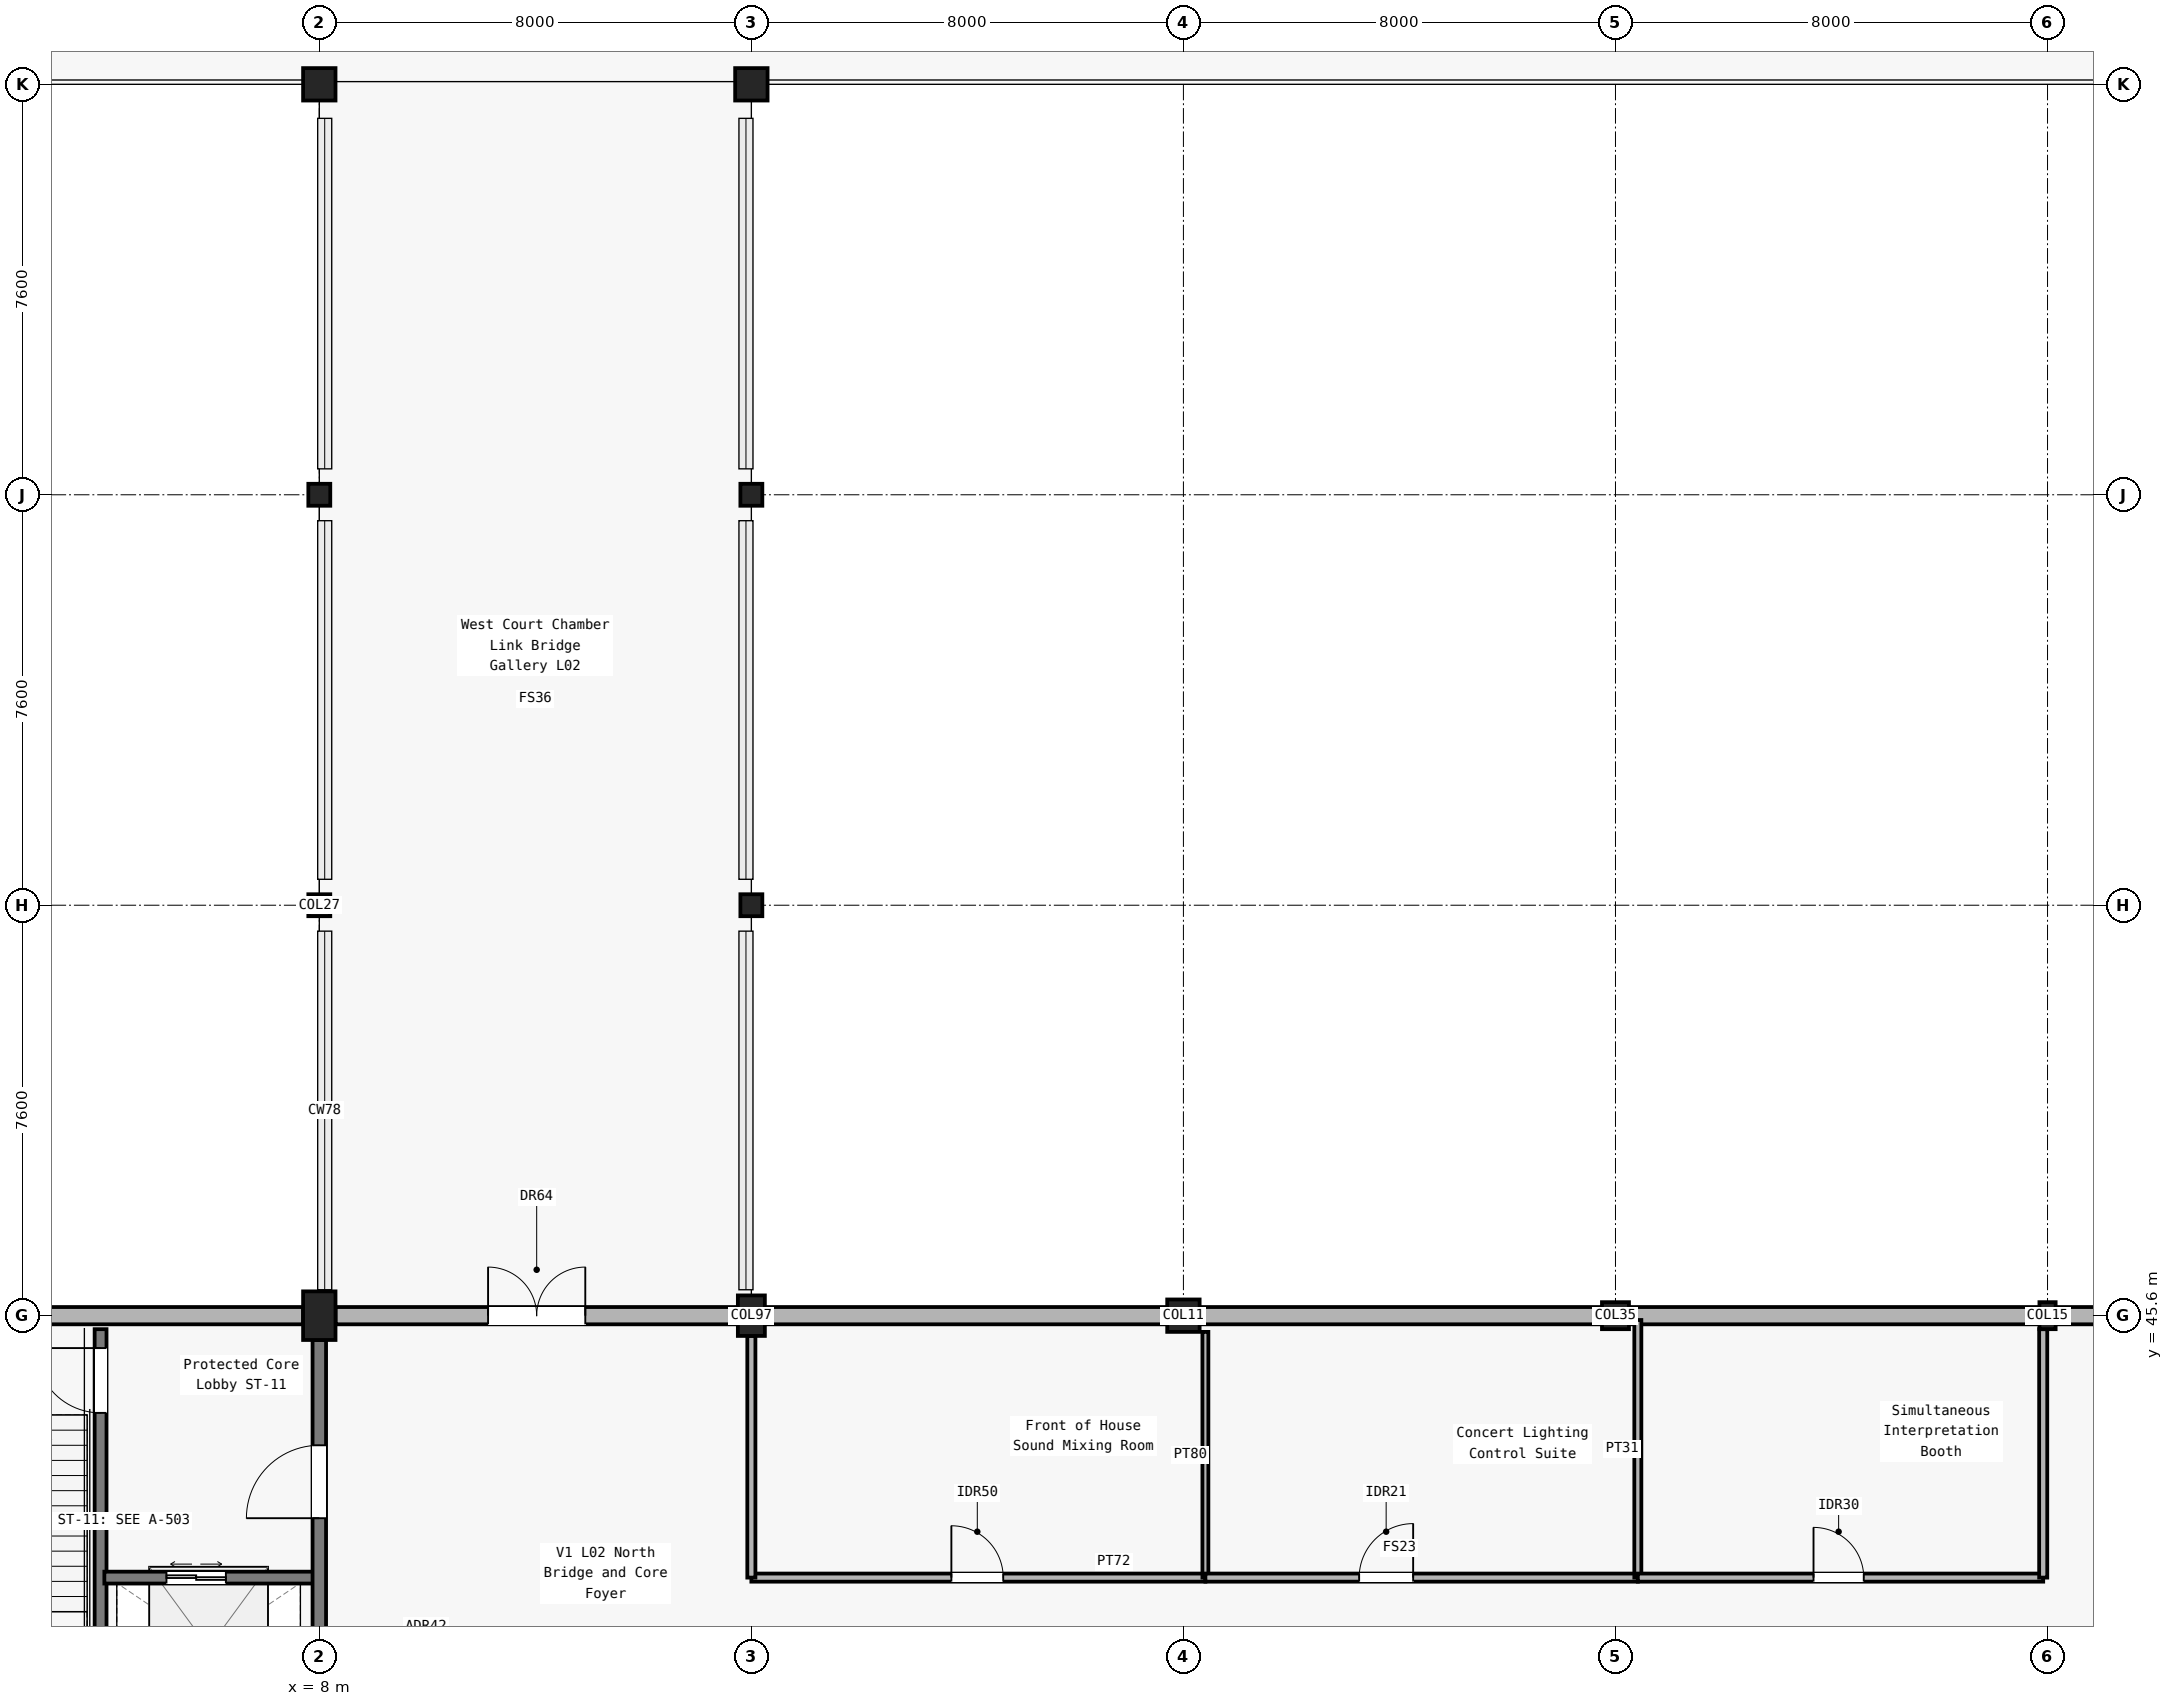
"""IFC4 building model, lengths in metres.
Left out: names, types, materials, properties, quantities, classifications, styles, units other than length and angle.
Written with IfcOpenShell. Run it as: python <this file> out.ifc"""

import sys

from ifc_helpers import new_model, si_unit, direction, frame, frame_2d, origin, origin_2d, place, context, subcontext, project, spatial, rectangle, hollow_circle, i_section, extrude, element, fill, save


model = new_model("IFC4")
c1 = context("Model", 3, precision=1e-05, world=origin(), true_north=direction((0.0, 1.0)))
c2 = subcontext(c1, "Body", "Model", "MODEL_VIEW")
j1 = project(units=[si_unit("LENGTHUNIT", "METRE"), si_unit("PLANEANGLEUNIT", "RADIAN")], contexts=[c1])
p1 = place(None, origin())
s1 = spatial("IfcSite", under=j1, at=p1, CompositionType="ELEMENT")
p2 = place(p1, origin())
s2 = spatial("IfcBuilding", under=s1, at=p2, CompositionType="ELEMENT")
p3 = place(p2, frame((0.0, 0.0, 10.2)))
s3 = spatial("IfcBuildingStorey", under=s2, at=p3, CompositionType="ELEMENT", Elevation=10.2)
p4 = place(p3, frame((8.0, 45.6, 0.0), z_axis=(0.0, 0.0, 1.0), x_axis=(1.0, 0.0, 0.0)))
e1 = element("IfcColumn", 1, at=p4, inside=s3, PredefinedType="COLUMN", context=c2, shape_type="SweptSolid", body=[
    extrude(rectangle(XDim=0.6, YDim=0.9, at=origin_2d()), origin(), (0.0, 0.0, 1.0), 4.8),
])
p5 = place(p3, frame((16.0, 45.6, 0.0), z_axis=(0.0, 0.0, 1.0), x_axis=(1.0, 0.0, 0.0)))
e2 = element("IfcColumn", 2, at=p5, inside=s3, PredefinedType="COLUMN", context=c2, shape_type="SweptSolid", body=[
    extrude(rectangle(XDim=0.5, YDim=0.75, at=origin_2d()), origin(), (0.0, 0.0, 1.0), 4.8),
])
p6 = place(p3, frame((24.0, 45.6, 0.0), z_axis=(0.0, 0.0, 1.0), x_axis=(1.0, 0.0, 0.0)))
e3 = element("IfcColumn", 3, at=p6, inside=s3, PredefinedType="COLUMN", context=c2, shape_type="SweptSolid", body=[
    extrude(rectangle(XDim=0.6, YDim=0.6, at=origin_2d()), origin(), (0.0, 0.0, 1.0), 4.8),
])
p7 = place(p3, frame((32.0, 45.6, 0.0), z_axis=(0.0, 0.0, 1.0), x_axis=(1.0, 0.0, 0.0)))
e4 = element("IfcColumn", 4, at=p7, inside=s3, PredefinedType="COLUMN", context=c2, shape_type="SweptSolid", body=[
    extrude(rectangle(XDim=0.5, YDim=0.5, at=origin_2d()), origin(), (0.0, 0.0, 1.0), 4.8),
])
p8 = place(p3, frame((40.0, 45.6, 0.0), z_axis=(0.0, 0.0, 1.0), x_axis=(1.0, 0.0, 0.0)))
e5 = element("IfcColumn", 5, at=p8, inside=s3, PredefinedType="COLUMN", context=c2, shape_type="SweptSolid", body=[
    extrude(i_section(OverallWidth=0.3, OverallDepth=0.5, WebThickness=0.014, FlangeThickness=0.028, FilletRadius=0.027, at=origin_2d()), origin(), (0.0, 0.0, 1.0), 4.8),
])
for number, where, z_axis, x_axis in (
    (6, (8.0, 68.4, 0.0), (0.0, 0.0, 1.0), (1.0, 0.0, 0.0)),
    (7, (16.0, 68.4, 0.0), (0.0, 0.0, 1.0), (1.0, 0.0, 0.0)),
):
    element("IfcColumn", number, at=place(p3, frame(where, z_axis=z_axis, x_axis=x_axis)), inside=s3, PredefinedType="COLUMN", context=c2, shape_type="SweptSolid", body=[
        extrude(rectangle(XDim=0.6, YDim=0.6, at=origin_2d()), origin(), (0.0, 0.0, 1.0), 4.8),
    ])
for number, where, z_axis, x_axis in (
    (8, (8.0, 53.2, 0.0), (0.0, 0.0, 1.0), (1.0, 0.0, 0.0)),
    (9, (8.0, 60.8, 0.0), (0.0, 0.0, 1.0), (1.0, 0.0, 0.0)),
    (10, (16.0, 53.2, 0.0), (0.0, 0.0, 1.0), (1.0, 0.0, 0.0)),
    (11, (16.0, 60.8, 0.0), (0.0, 0.0, 1.0), (1.0, 0.0, 0.0)),
):
    element("IfcColumn", number, at=place(p3, frame(where, z_axis=z_axis, x_axis=x_axis)), inside=s3, PredefinedType="COLUMN", context=c2, shape_type="SweptSolid", body=[
        extrude(hollow_circle(Radius=0.203, WallThickness=0.02, at=origin_2d()), origin(), (0.0, 0.0, 1.0), 4.58),
    ])
p9 = place(p3, frame((0.35, 45.6, 0.0), z_axis=(0.0, 0.0, 1.0), x_axis=(1.0, 0.0, 0.0)))
e12 = element("IfcWall", 12, at=p9, inside=s3, PredefinedType="SOLIDWALL", context=c2, shape_type="SweptSolid", body=[
    extrude(rectangle(XDim=7.35, YDim=0.32, at=frame_2d((3.675, 0.0))), origin(), (0.0, 0.0, 1.0), 3.86),
])
p10 = place(p3, frame((8.3, 45.6, 0.0), z_axis=(0.0, 0.0, 1.0), x_axis=(1.0, 0.0, 0.0)))
e13 = element("IfcWall", 13, at=p10, inside=s3, PredefinedType="SOLIDWALL", context=c2, shape_type="SweptSolid", body=[
    extrude(rectangle(XDim=7.45, YDim=0.32, at=frame_2d((3.725, 0.0))), origin(), (0.0, 0.0, 1.0), 3.86),
])
p11 = place(p10, frame((2.825, 0.0, 0.0)))
e14 = element("IfcOpeningElement", 14, at=p11, cuts=e13, PredefinedType="OPENING", context=c2, shape_type="SweptSolid", body=[
    extrude(rectangle(XDim=1.8, YDim=2.25, at=frame_2d((0.9, 1.125))), frame((0.0, 0.17, 0.0), z_axis=(0.0, -1.0, 0.0), x_axis=(1.0, 0.0, 0.0)), (0.0, 0.0, 1.0), 0.34),
])
p12 = place(p3, frame((16.25, 45.6, 0.0), z_axis=(0.0, 0.0, 1.0), x_axis=(1.0, 0.0, 0.0)))
e15 = element("IfcWall", 15, at=p12, inside=s3, PredefinedType="SOLIDWALL", context=c2, shape_type="SweptSolid", body=[
    extrude(rectangle(XDim=7.45, YDim=0.32, at=frame_2d((3.725, 0.0))), origin(), (0.0, 0.0, 1.0), 3.86),
])
p13 = place(p3, frame((24.3, 45.6, 0.0), z_axis=(0.0, 0.0, 1.0), x_axis=(1.0, 0.0, 0.0)))
e16 = element("IfcWall", 16, at=p13, inside=s3, PredefinedType="SOLIDWALL", context=c2, shape_type="SweptSolid", body=[
    extrude(rectangle(XDim=7.45, YDim=0.32, at=frame_2d((3.725, 0.0))), origin(), (0.0, 0.0, 1.0), 3.91),
])
p14 = place(p3, frame((32.25, 45.6, 0.0), z_axis=(0.0, 0.0, 1.0), x_axis=(1.0, 0.0, 0.0)))
e17 = element("IfcWall", 17, at=p14, inside=s3, PredefinedType="SOLIDWALL", context=c2, shape_type="SweptSolid", body=[
    extrude(rectangle(XDim=7.6, YDim=0.32, at=frame_2d((3.8, 0.0))), origin(), (0.0, 0.0, 1.0), 3.41),
])
p15 = place(p3, frame((40.15, 45.6, 0.0), z_axis=(0.0, 0.0, 1.0), x_axis=(1.0, 0.0, 0.0)))
e18 = element("IfcWall", 18, at=p15, inside=s3, PredefinedType="SOLIDWALL", context=c2, shape_type="SweptSolid", body=[
    extrude(rectangle(XDim=9.3, YDim=0.32, at=frame_2d((4.65, 0.0))), origin(), (0.0, 0.0, 1.0), 3.41),
])
p16 = place(p3, frame((3.95, 38.25, 0.0), z_axis=(0.0, 0.0, 1.0), x_axis=(0.0, 1.0, 0.0)))
e19 = element("IfcWall", 19, at=p16, inside=s3, PredefinedType="SOLIDWALL", context=c2, shape_type="SweptSolid", body=[
    extrude(rectangle(XDim=7.1, YDim=0.22, at=frame_2d((3.55, 0.0))), origin(), (0.0, 0.0, 1.0), 4.52),
])
p17 = place(p16, frame((5.55, 0.0, 0.0)))
e20 = element("IfcOpeningElement", 20, at=p17, cuts=e19, PredefinedType="OPENING", context=c2, shape_type="SweptSolid", body=[
    extrude(rectangle(XDim=1.2, YDim=2.15, at=frame_2d((0.6, 1.075))), frame((0.0, 0.12, 0.0), z_axis=(0.0, -1.0, 0.0), x_axis=(1.0, 0.0, 0.0)), (0.0, 0.0, 1.0), 0.24),
])
p18 = place(p3, frame((4.02, 40.75, 0.0), z_axis=(0.0, 0.0, 1.0), x_axis=(1.0, 0.0, 0.0)))
e21 = element("IfcWall", 21, at=p18, inside=s3, PredefinedType="SOLIDWALL", context=c2, shape_type="SweptSolid", body=[
    extrude(rectangle(XDim=3.93, YDim=0.22, at=frame_2d((1.965, 0.0))), origin(), (0.0, 0.0, 1.0), 3.87),
])
p19 = place(p18, frame((1.15, 0.0, 0.0)))
e22 = element("IfcOpeningElement", 22, at=p19, cuts=e21, PredefinedType="OPENING", context=c2, shape_type="SweptSolid", body=[
    extrude(rectangle(XDim=1.1, YDim=2.2, at=frame_2d((0.55, 1.1))), frame((0.0, 0.12, 0.0), z_axis=(0.0, -1.0, 0.0), x_axis=(1.0, 0.0, 0.0)), (0.0, 0.0, 1.0), 0.24),
])
p20 = place(p3, frame((8.0, 38.35, 0.0), z_axis=(0.0, 0.0, 1.0), x_axis=(0.0, 1.0, 0.0)))
e23 = element("IfcWall", 23, at=p20, inside=s3, PredefinedType="SOLIDWALL", context=c2, shape_type="SweptSolid", body=[
    extrude(rectangle(XDim=6.8, YDim=0.25, at=frame_2d((3.4, 0.0))), origin(), (0.0, 0.0, 1.0), 3.76),
])
p21 = place(p20, frame((3.5, 0.0, 0.0)))
e24 = element("IfcOpeningElement", 24, at=p21, cuts=e23, PredefinedType="OPENING", context=c2, shape_type="SweptSolid", body=[
    extrude(rectangle(XDim=1.35, YDim=2.2, at=frame_2d((0.675, 1.1))), frame((0.0, 0.135, 0.0), z_axis=(0.0, -1.0, 0.0), x_axis=(1.0, 0.0, 0.0)), (0.0, 0.0, 1.0), 0.27),
])
p22 = place(p3, frame((16.0, 40.75, 0.0), z_axis=(0.0, 0.0, 1.0), x_axis=(1.0, 0.0, 0.0)))
e25 = element("IfcWall", 25, at=p22, inside=s3, PredefinedType="PARTITIONING", context=c2, shape_type="SweptSolid", body=[
    extrude(rectangle(XDim=8.407, YDim=0.15, at=frame_2d((4.204, 0.0))), origin(), (0.0, 0.0, 1.0), 3.82),
])
p23 = place(p22, frame((3.704, 0.0, 0.0)))
e26 = element("IfcOpeningElement", 26, at=p23, cuts=e25, PredefinedType="OPENING", context=c2, shape_type="SweptSolid", body=[
    extrude(rectangle(XDim=0.96, YDim=2.05, at=frame_2d((0.48, 1.025))), frame((0.0, 0.085, 0.0), z_axis=(0.0, -1.0, 0.0), x_axis=(1.0, 0.0, 0.0)), (0.0, 0.0, 1.0), 0.17),
])
p24 = place(p3, frame((24.407, 40.75, 0.0), z_axis=(0.0, 0.0, 1.0), x_axis=(0.0, 1.0, 0.0)))
e27 = element("IfcWall", 27, at=p24, inside=s3, PredefinedType="PARTITIONING", context=c2, shape_type="SweptSolid", body=[
    extrude(rectangle(XDim=4.55, YDim=0.11, at=frame_2d((2.275, 0.0))), origin(), (0.0, 0.0, 1.0), 3.82),
])
p25 = place(p3, frame((24.407, 40.75, 0.0), z_axis=(0.0, 0.0, 1.0), x_axis=(1.0, 0.0, 0.0)))
e28 = element("IfcWall", 28, at=p25, inside=s3, PredefinedType="PARTITIONING", context=c2, shape_type="SweptSolid", body=[
    extrude(rectangle(XDim=8.007, YDim=0.15, at=frame_2d((4.003, 0.0))), origin(), (0.0, 0.0, 1.0), 3.82),
])
p26 = place(p25, frame((2.847, 0.0, 0.0)))
e29 = element("IfcOpeningElement", 29, at=p26, cuts=e28, PredefinedType="OPENING", context=c2, shape_type="SweptSolid", body=[
    extrude(rectangle(XDim=1.0, YDim=2.05, at=frame_2d((0.5, 1.025))), frame((0.0, 0.085, 0.0), z_axis=(0.0, -1.0, 0.0), x_axis=(1.0, 0.0, 0.0)), (0.0, 0.0, 1.0), 0.17),
])
p27 = place(p3, frame((32.414, 40.75, 0.0), z_axis=(0.0, 0.0, 1.0), x_axis=(0.0, 1.0, 0.0)))
e30 = element("IfcWall", 30, at=p27, inside=s3, PredefinedType="PARTITIONING", context=c2, shape_type="SweptSolid", body=[
    extrude(rectangle(XDim=4.77, YDim=0.13, at=frame_2d((2.385, 0.0))), origin(), (0.0, 0.0, 1.0), 3.77),
])
p28 = place(p3, frame((32.414, 40.75, 0.0), z_axis=(0.0, 0.0, 1.0), x_axis=(1.0, 0.0, 0.0)))
e31 = element("IfcWall", 31, at=p28, inside=s3, PredefinedType="PARTITIONING", context=c2, shape_type="SweptSolid", body=[
    extrude(rectangle(XDim=7.506, YDim=0.15, at=frame_2d((3.753, 0.0))), origin(), (0.0, 0.0, 1.0), 3.875),
])
p29 = place(p28, frame((3.253, 0.0, 0.0)))
e32 = element("IfcOpeningElement", 32, at=p29, cuts=e31, PredefinedType="OPENING", context=c2, shape_type="SweptSolid", body=[
    extrude(rectangle(XDim=0.93, YDim=2.1, at=frame_2d((0.465, 1.05))), frame((0.0, 0.085, 0.0), z_axis=(0.0, -1.0, 0.0), x_axis=(1.0, 0.0, 0.0)), (0.0, 0.0, 1.0), 0.17),
])
p30 = place(p3, frame((16.0, 40.75, 0.0), z_axis=(0.0, 0.0, 1.0), x_axis=(0.0, 1.0, 0.0)))
e33 = element("IfcWall", 33, at=p30, inside=s3, PredefinedType="PARTITIONING", context=c2, shape_type="SweptSolid", body=[
    extrude(rectangle(XDim=4.475, YDim=0.15, at=frame_2d((2.238, 0.0))), origin(), (0.0, 0.0, 1.0), 3.655),
])
p31 = place(p3, frame((39.92, 40.75, 0.0), z_axis=(0.0, 0.0, 1.0), x_axis=(0.0, 1.0, 0.0)))
e34 = element("IfcWall", 34, at=p31, inside=s3, PredefinedType="PARTITIONING", context=c2, shape_type="SweptSolid", body=[
    extrude(rectangle(XDim=4.6, YDim=0.15, at=frame_2d((2.3, 0.0))), origin(), (0.0, 0.0, 1.0), 3.41),
])
p32 = place(p11, origin())
e35 = element("IfcDoor", 35, at=p32, inside=s3, OperationType="DOUBLE_DOOR_SINGLE_SWING", PredefinedType="DOOR", context=c2, shape_type="SweptSolid", body=[
    extrude(rectangle(XDim=1.8, YDim=2.25, at=frame_2d((0.9, 1.125))), frame((0.0, 0.025, 0.0), z_axis=(0.0, -1.0, 0.0), x_axis=(1.0, 0.0, 0.0)), (0.0, 0.0, 1.0), 0.05),
])
fill(e14, e35)
p33 = place(p17, origin())
e36 = element("IfcDoor", 36, at=p33, inside=s3, OperationType="SINGLE_SWING_RIGHT", PredefinedType="DOOR", context=c2, shape_type="SweptSolid", body=[
    extrude(rectangle(XDim=1.2, YDim=2.15, at=frame_2d((0.6, 1.075))), frame((0.0, 0.025, 0.0), z_axis=(0.0, -1.0, 0.0), x_axis=(1.0, 0.0, 0.0)), (0.0, 0.0, 1.0), 0.05),
])
fill(e20, e36)
p34 = place(p19, origin())
e37 = element("IfcDoor", 37, at=p34, inside=s3, OperationType="DOUBLE_DOOR_SLIDING", PredefinedType="DOOR", context=c2, shape_type="SweptSolid", body=[
    extrude(rectangle(XDim=1.1, YDim=2.2, at=frame_2d((0.55, 1.1))), frame((0.0, 0.025, 0.0), z_axis=(0.0, -1.0, 0.0), x_axis=(1.0, 0.0, 0.0)), (0.0, 0.0, 1.0), 0.05),
])
fill(e22, e37)
p35 = place(p21, origin())
e38 = element("IfcDoor", 38, at=p35, inside=s3, OperationType="SINGLE_SWING_LEFT", PredefinedType="DOOR", context=c2, shape_type="SweptSolid", body=[
    extrude(rectangle(XDim=1.35, YDim=2.2, at=frame_2d((0.675, 1.1))), frame((0.0, 0.025, 0.0), z_axis=(0.0, -1.0, 0.0), x_axis=(1.0, 0.0, 0.0)), (0.0, 0.0, 1.0), 0.05),
])
fill(e24, e38)
p36 = place(p23, origin())
e39 = element("IfcDoor", 39, at=p36, inside=s3, OperationType="SINGLE_SWING_LEFT", PredefinedType="DOOR", context=c2, shape_type="SweptSolid", body=[
    extrude(rectangle(XDim=0.96, YDim=2.05, at=frame_2d((0.48, 1.025))), frame((0.0, 0.025, 0.0), z_axis=(0.0, -1.0, 0.0), x_axis=(1.0, 0.0, 0.0)), (0.0, 0.0, 1.0), 0.05),
])
fill(e26, e39)
p37 = place(p26, origin())
e40 = element("IfcDoor", 40, at=p37, inside=s3, OperationType="SINGLE_SWING_RIGHT", PredefinedType="DOOR", context=c2, shape_type="SweptSolid", body=[
    extrude(rectangle(XDim=1.0, YDim=2.05, at=frame_2d((0.5, 1.025))), frame((0.0, 0.025, 0.0), z_axis=(0.0, -1.0, 0.0), x_axis=(1.0, 0.0, 0.0)), (0.0, 0.0, 1.0), 0.05),
])
fill(e29, e40)
p38 = place(p29, origin())
e41 = element("IfcDoor", 41, at=p38, inside=s3, OperationType="SINGLE_SWING_LEFT", PredefinedType="DOOR", context=c2, shape_type="SweptSolid", body=[
    extrude(rectangle(XDim=0.93, YDim=2.1, at=frame_2d((0.465, 1.05))), frame((0.0, 0.025, 0.0), z_axis=(0.0, -1.0, 0.0), x_axis=(1.0, 0.0, 0.0)), (0.0, 0.0, 1.0), 0.05),
])
fill(e32, e41)
save(model, sys.argv[1])
